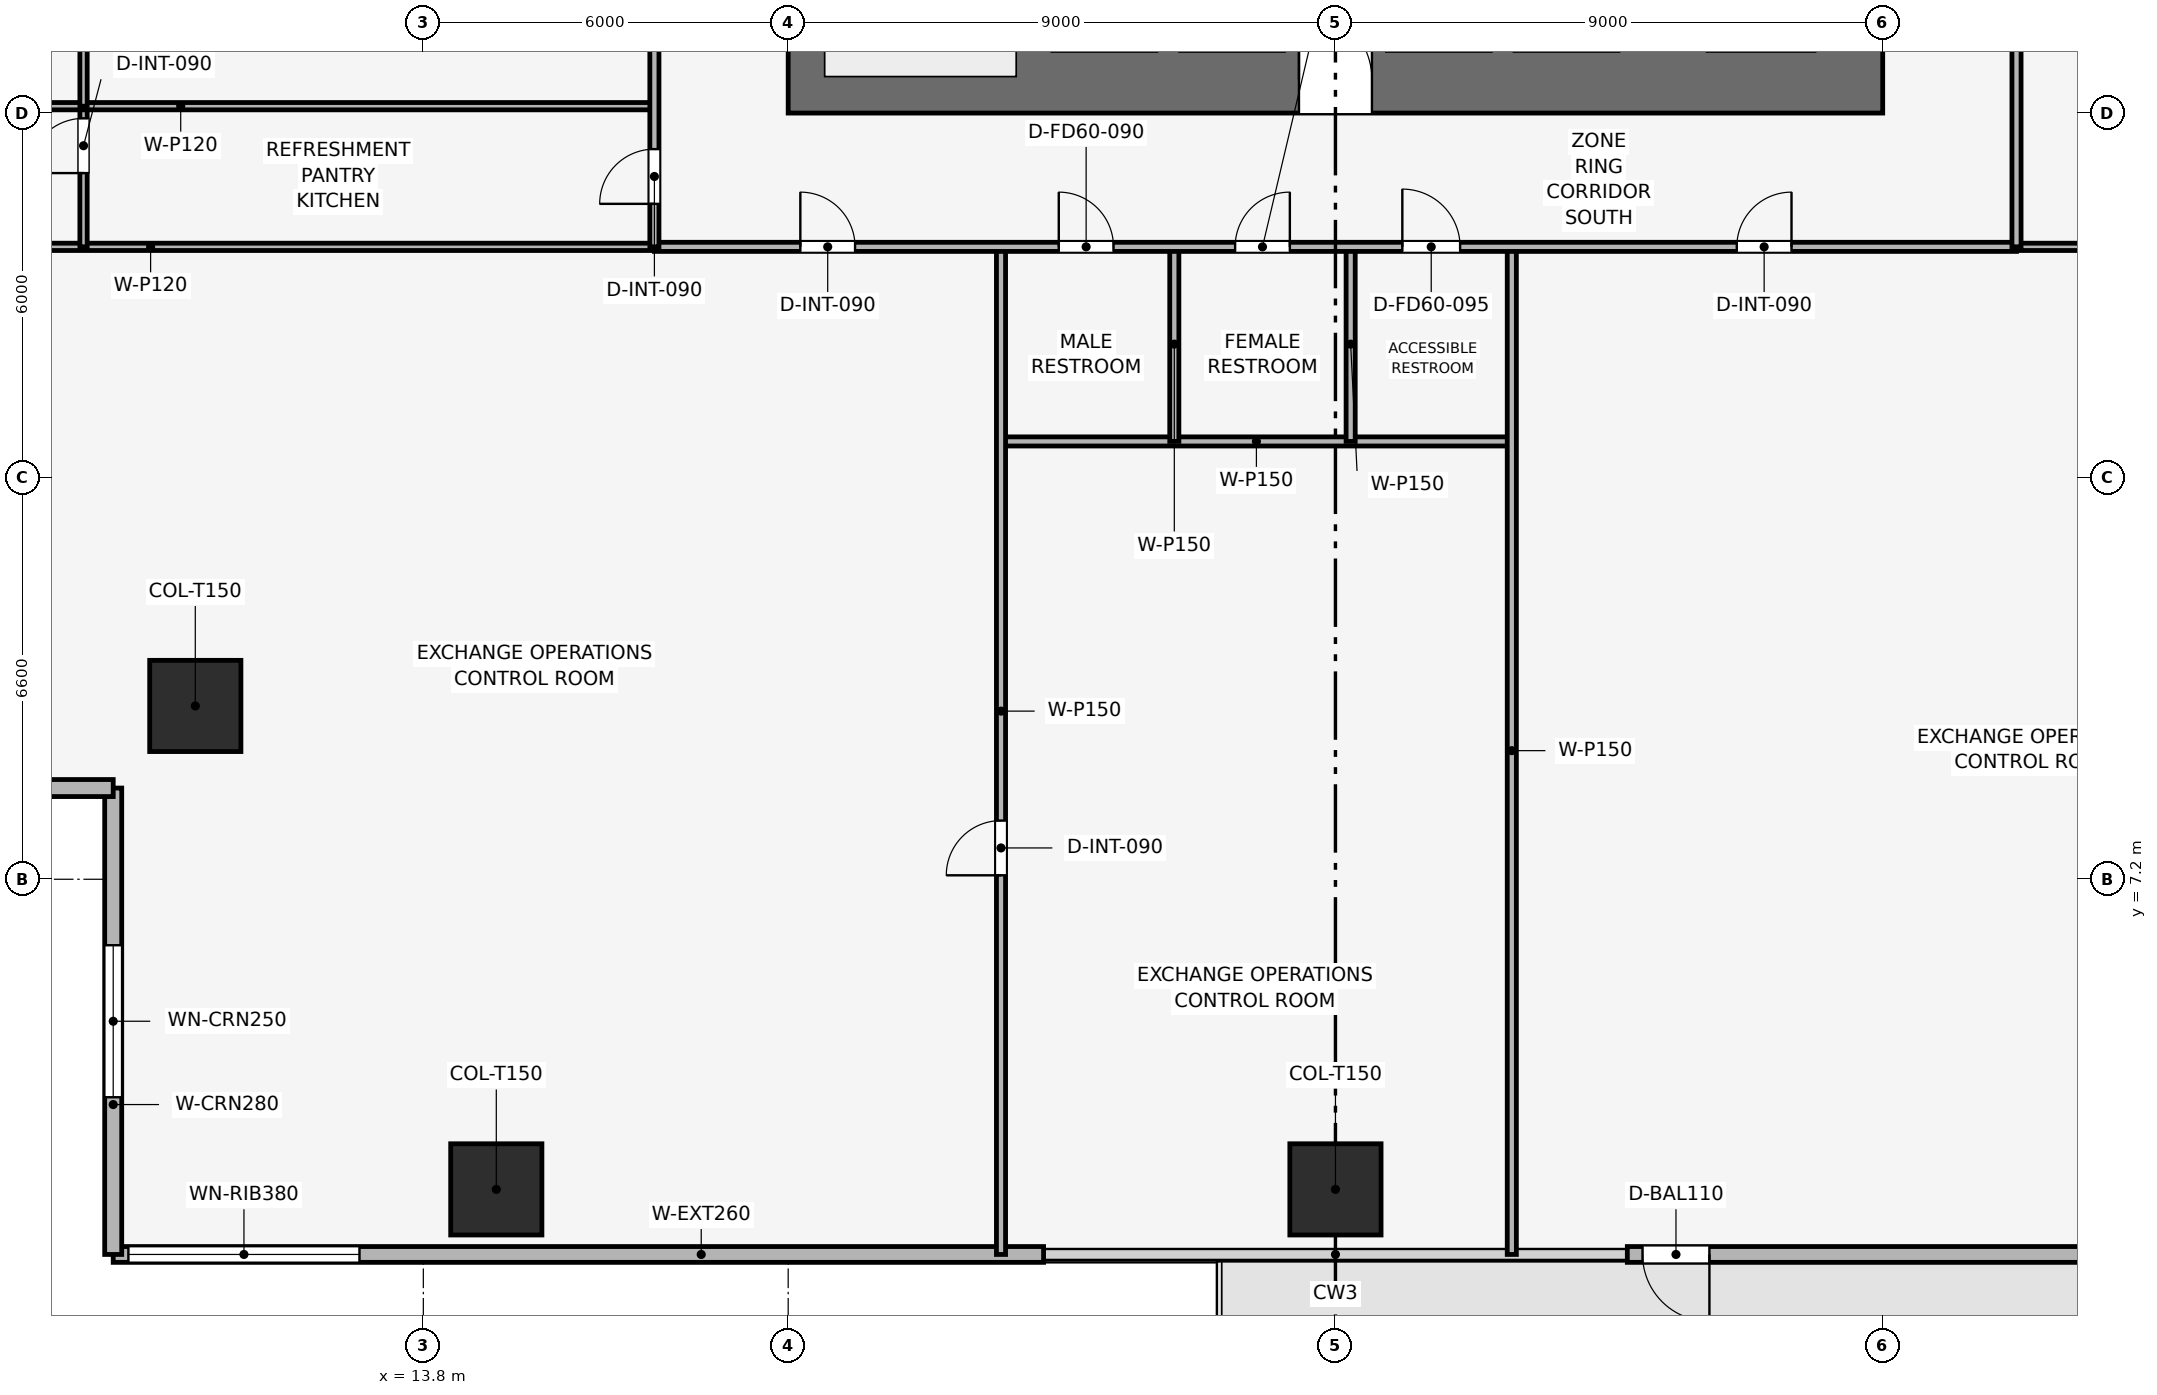
"""IFC4 building model, lengths in metres.
Left out: names, types, materials, properties, quantities, classifications, styles, units other than length and angle.
Written with IfcOpenShell. Run it as: python <this file> out.ifc"""

import sys

from ifc_helpers import new_model, si_unit, direction, frame, frame_2d, origin, origin_2d, place, context, subcontext, project, spatial, rectangle, extrude, element, fill, save


model = new_model("IFC4")
c1 = context("Model", 3, precision=1e-05, world=origin(), true_north=direction((0.0, 1.0)))
c2 = subcontext(c1, "Body", "Model", "MODEL_VIEW")
j1 = project(units=[si_unit("LENGTHUNIT", "METRE"), si_unit("PLANEANGLEUNIT", "RADIAN")], contexts=[c1])
p1 = place(None, origin())
s1 = spatial("IfcSite", under=j1, at=p1, CompositionType="ELEMENT")
p2 = place(p1, origin())
s2 = spatial("IfcBuilding", under=s1, at=p2, CompositionType="ELEMENT")
p3 = place(p2, frame((0.0, 0.0, 80.7)))
s3 = spatial("IfcBuildingStorey", under=s2, at=p3, CompositionType="ELEMENT", Elevation=80.7)
p4 = place(p3, frame((19.8, 20.35, 0.0), z_axis=(0.0, 0.0, 1.0), x_axis=(1.0, 0.0, 0.0)))
e1 = element("IfcWall", 1, at=p4, inside=s3, PredefinedType="SHEAR", context=c2, shape_type="SweptSolid", body=[
    extrude(rectangle(XDim=18.0, YDim=1.1, at=frame_2d((9.0, 0.0))), origin(), (0.0, 0.0, 1.0), 3.9),
])
p5 = place(p4, frame((8.4, 0.0, 0.0)))
e2 = element("IfcOpeningElement", 2, at=p5, cuts=e1, PredefinedType="OPENING", context=c2, shape_type="SweptSolid", body=[
    extrude(rectangle(XDim=1.2, YDim=2.2, at=frame_2d((0.6, 1.1))), frame((0.0, 0.56, 0.0), z_axis=(0.0, -1.0, 0.0), x_axis=(1.0, 0.0, 0.0)), (0.0, 0.0, 1.0), 1.12),
])
for number, where, z_axis, x_axis in (
    (3, (15.0, 2.1, 0.003), (0.0, 0.0, 1.0), (1.0, 0.0, 0.0)),
    (4, (28.8, 2.1, 0.003), (0.0, 0.0, 1.0), (1.0, 0.0, 0.0)),
    (5, (10.05, 10.05, 0.003), (0.0, 0.0, 1.0), (1.0, 0.0, 0.0)),
):
    element("IfcColumn", number, at=place(p3, frame(where, z_axis=z_axis, x_axis=x_axis)), inside=s3, PredefinedType="COLUMN", context=c2, shape_type="SweptSolid", body=[
        extrude(rectangle(XDim=1.5, YDim=1.5, at=origin_2d()), origin(), (0.0, 0.0, 1.0), 3.644),
    ])
p6 = place(p3, frame((48.9, 1.03, 0.0), z_axis=(0.0, 0.0, 1.0), x_axis=(-1.0, 0.0, 0.0)))
e6 = element("IfcWall", 6, at=p6, inside=s3, PredefinedType="SOLIDWALL", context=c2, shape_type="SweptSolid", body=[
    extrude(rectangle(XDim=15.3, YDim=0.26, at=frame_2d((7.65, 0.0))), origin(), (0.0, 0.0, 1.0), 3.65),
])
p7 = place(p6, frame((13.95, 0.0, 0.0)))
e7 = element("IfcOpeningElement", 7, at=p7, cuts=e6, PredefinedType="OPENING", context=c2, shape_type="SweptSolid", body=[
    extrude(rectangle(XDim=1.1, YDim=2.2, at=frame_2d((0.55, 1.1))), frame((0.0, 0.14, 0.0), z_axis=(0.0, -1.0, 0.0), x_axis=(1.0, 0.0, 0.0)), (0.0, 0.0, 1.0), 0.28),
])
p8 = place(p3, frame((24.0, 1.03, 0.0), z_axis=(0.0, 0.0, 1.0), x_axis=(-1.0, 0.0, 0.0)))
e8 = element("IfcWall", 8, at=p8, inside=s3, PredefinedType="SOLIDWALL", context=c2, shape_type="SweptSolid", body=[
    extrude(rectangle(XDim=15.3, YDim=0.26, at=frame_2d((7.65, 0.0))), origin(), (0.0, 0.0, 1.0), 3.65),
])
p9 = place(p8, frame((11.25, 0.0, 0.9)))
e9 = element("IfcOpeningElement", 9, at=p9, cuts=e8, PredefinedType="OPENING", context=c2, shape_type="SweptSolid", body=[
    extrude(rectangle(XDim=3.8, YDim=1.9, at=frame_2d((1.9, 0.95))), frame((0.0, 0.14, 0.0), z_axis=(0.0, -1.0, 0.0), x_axis=(1.0, 0.0, 0.0)), (0.0, 0.0, 1.0), 0.28),
])
p10 = place(p3, frame((8.7, 1.03, 0.0), z_axis=(0.0, 0.0, 1.0), x_axis=(0.0, 1.0, 0.0)))
e10 = element("IfcWall", 10, at=p10, inside=s3, PredefinedType="SOLIDWALL", context=c2, shape_type="SweptSolid", body=[
    extrude(rectangle(XDim=7.67, YDim=0.28, at=frame_2d((3.835, 0.0))), origin(), (0.0, 0.0, 1.0), 3.65),
])
p11 = place(p10, frame((2.585, 0.0, 0.9)))
e11 = element("IfcOpeningElement", 11, at=p11, cuts=e10, PredefinedType="OPENING", context=c2, shape_type="SweptSolid", body=[
    extrude(rectangle(XDim=2.5, YDim=1.9, at=frame_2d((1.25, 0.95))), frame((0.0, 0.15, 0.0), z_axis=(0.0, -1.0, 0.0), x_axis=(1.0, 0.0, 0.0)), (0.0, 0.0, 1.0), 0.3),
])
p12 = place(p3, frame((8.7, 8.7, 0.0), z_axis=(0.0, 0.0, 1.0), x_axis=(-1.0, 0.0, 0.0)))
e12 = element("IfcWall", 12, at=p12, inside=s3, PredefinedType="SOLIDWALL", context=c2, shape_type="SweptSolid", body=[
    extrude(rectangle(XDim=7.67, YDim=0.28, at=frame_2d((3.835, 0.0))), origin(), (0.0, 0.0, 1.0), 3.65),
])
p13 = place(p12, frame((2.585, 0.0, 0.9)))
e13 = element("IfcOpeningElement", 13, at=p13, cuts=e12, PredefinedType="OPENING", context=c2, shape_type="SweptSolid", body=[
    extrude(rectangle(XDim=2.5, YDim=1.9, at=frame_2d((1.25, 0.95))), frame((0.0, 0.15, 0.0), z_axis=(0.0, -1.0, 0.0), x_axis=(1.0, 0.0, 0.0)), (0.0, 0.0, 1.0), 0.3),
])
p14 = place(p3, frame((23.3, 14.4, 0.0), z_axis=(0.0, 0.0, 1.0), x_axis=(1.0, 0.0, 0.0)))
e14 = element("IfcWall", 14, at=p14, inside=s3, PredefinedType="PARTITIONING", context=c2, shape_type="SweptSolid", body=[
    extrude(rectangle(XDim=8.4, YDim=0.15, at=frame_2d((4.2, 0.0))), origin(), (0.0, 0.0, 1.0), 3.085),
])
p15 = place(p3, frame((23.3, 1.03, 0.0), z_axis=(0.0, 0.0, 1.0), x_axis=(0.0, 1.0, 0.0)))
e15 = element("IfcWall", 15, at=p15, inside=s3, PredefinedType="PARTITIONING", context=c2, shape_type="SweptSolid", body=[
    extrude(rectangle(XDim=16.57, YDim=0.15, at=frame_2d((8.285, 0.0))), origin(), (0.0, 0.0, 1.0), 2.935),
])
p16 = place(p15, frame((6.235, 0.0, 0.0)))
e16 = element("IfcOpeningElement", 16, at=p16, cuts=e15, PredefinedType="OPENING", context=c2, shape_type="SweptSolid", body=[
    extrude(rectangle(XDim=0.9, YDim=2.1, at=frame_2d((0.45, 1.05))), frame((0.0, 0.085, 0.0), z_axis=(0.0, -1.0, 0.0), x_axis=(1.0, 0.0, 0.0)), (0.0, 0.0, 1.0), 0.17),
])
p17 = place(p3, frame((31.7, 1.03, 0.0), z_axis=(0.0, 0.0, 1.0), x_axis=(0.0, 1.0, 0.0)))
e17 = element("IfcWall", 17, at=p17, inside=s3, PredefinedType="PARTITIONING", context=c2, shape_type="SweptSolid", body=[
    extrude(rectangle(XDim=16.57, YDim=0.15, at=frame_2d((8.285, 0.0))), origin(), (0.0, 0.0, 1.0), 2.935),
])
for number, where, z_axis, x_axis in (
    (18, (26.15, 14.4, 0.0), (0.0, 0.0, 1.0), (0.0, 1.0, 0.0)),
    (19, (29.05, 14.4, 0.0), (0.0, 0.0, 1.0), (0.0, 1.0, 0.0)),
):
    element("IfcWall", number, at=place(p3, frame(where, z_axis=z_axis, x_axis=x_axis)), inside=s3, PredefinedType="PARTITIONING", context=c2, shape_type="SweptSolid", body=[
        extrude(rectangle(XDim=3.2, YDim=0.15, at=frame_2d((1.6, 0.0))), origin(), (0.0, 0.0, 1.0), 3.65),
    ])
for number, where, z_axis, x_axis in (
    (20, (1.03, 17.6, 0.0), (0.0, 0.0, 1.0), (1.0, 0.0, 0.0)),
    (21, (40.0, 17.6, 0.0), (0.0, 0.0, 1.0), (1.0, 0.0, 0.0)),
):
    element("IfcWall", number, at=place(p3, frame(where, z_axis=z_axis, x_axis=x_axis)), inside=s3, PredefinedType="PARTITIONING", context=c2, shape_type="SweptSolid", body=[
        extrude(rectangle(XDim=16.57, YDim=0.12, at=frame_2d((8.285, 0.0))), origin(), (0.0, 0.0, 1.0), 2.935),
    ])
p18 = place(p3, frame((8.212, 17.6, 0.0), z_axis=(0.0, 0.0, 1.0), x_axis=(0.0, 1.0, 0.0)))
e22 = element("IfcWall", 22, at=p18, inside=s3, PredefinedType="PARTITIONING", context=c2, shape_type="SweptSolid", body=[
    extrude(rectangle(XDim=2.313, YDim=0.12, at=frame_2d((1.156, 0.0))), origin(), (0.0, 0.0, 1.0), 3.65),
])
p19 = place(p18, frame((1.213, 0.0, 0.0)))
e23 = element("IfcOpeningElement", 23, at=p19, cuts=e22, PredefinedType="OPENING", context=c2, shape_type="SweptSolid", body=[
    extrude(rectangle(XDim=0.9, YDim=2.1, at=frame_2d((0.45, 1.05))), frame((0.0, 0.07, 0.0), z_axis=(0.0, -1.0, 0.0), x_axis=(1.0, 0.0, 0.0)), (0.0, 0.0, 1.0), 0.14),
])
p20 = place(p3, frame((1.03, 19.913, 0.0), z_axis=(0.0, 0.0, 1.0), x_axis=(1.0, 0.0, 0.0)))
e24 = element("IfcWall", 24, at=p20, inside=s3, PredefinedType="PARTITIONING", context=c2, shape_type="SweptSolid", body=[
    extrude(rectangle(XDim=16.57, YDim=0.12, at=frame_2d((8.285, 0.0))), origin(), (0.0, 0.0, 1.0), 2.935),
])
p21 = place(p3, frame((8.212, 19.913, 0.0), z_axis=(0.0, 0.0, 1.0), x_axis=(0.0, 1.0, 0.0)))
e25 = element("IfcWall", 25, at=p21, inside=s3, PredefinedType="PARTITIONING", context=c2, shape_type="SweptSolid", body=[
    extrude(rectangle(XDim=5.764, YDim=0.12, at=frame_2d((2.882, 0.0))), origin(), (0.0, 0.0, 1.0), 3.085),
])
p22 = place(p21, frame((1.502, 0.0, 0.0)))
e26 = element("IfcOpeningElement", 26, at=p22, cuts=e25, PredefinedType="OPENING", context=c2, shape_type="SweptSolid", body=[
    extrude(rectangle(XDim=0.9, YDim=2.1, at=frame_2d((0.45, 1.05))), frame((0.0, 0.07, 0.0), z_axis=(0.0, -1.0, 0.0), x_axis=(1.0, 0.0, 0.0)), (0.0, 0.0, 1.0), 0.14),
])
p23 = place(p3, frame((17.6, 17.6, 0.0), z_axis=(0.0, 0.0, 1.0), x_axis=(1.0, 0.0, 0.0)))
e27 = element("IfcWall", 27, at=p23, inside=s3, PredefinedType="PARTITIONING", context=c2, shape_type="SweptSolid", body=[
    extrude(rectangle(XDim=22.4, YDim=0.15, at=frame_2d((11.2, 0.0))), origin(), (0.0, 0.0, 1.0), 3.085),
])
p24 = place(p23, frame((2.4, 0.0, 0.0)))
e28 = element("IfcOpeningElement", 28, at=p24, cuts=e27, PredefinedType="OPENING", context=c2, shape_type="SweptSolid", body=[
    extrude(rectangle(XDim=0.9, YDim=2.1, at=frame_2d((0.45, 1.05))), frame((0.0, 0.085, 0.0), z_axis=(0.0, -1.0, 0.0), x_axis=(1.0, 0.0, 0.0)), (0.0, 0.0, 1.0), 0.17),
])
p25 = place(p23, frame((6.65, 0.0, 0.0)))
e29 = element("IfcOpeningElement", 29, at=p25, cuts=e27, PredefinedType="OPENING", context=c2, shape_type="SweptSolid", body=[
    extrude(rectangle(XDim=0.9, YDim=2.1, at=frame_2d((0.45, 1.05))), frame((0.0, 0.085, 0.0), z_axis=(0.0, -1.0, 0.0), x_axis=(1.0, 0.0, 0.0)), (0.0, 0.0, 1.0), 0.17),
])
p26 = place(p23, frame((9.55, 0.0, 0.0)))
e30 = element("IfcOpeningElement", 30, at=p26, cuts=e27, PredefinedType="OPENING", context=c2, shape_type="SweptSolid", body=[
    extrude(rectangle(XDim=0.9, YDim=2.1, at=frame_2d((0.45, 1.05))), frame((0.0, 0.085, 0.0), z_axis=(0.0, -1.0, 0.0), x_axis=(1.0, 0.0, 0.0)), (0.0, 0.0, 1.0), 0.17),
])
p27 = place(p23, frame((12.3, 0.0, 0.0)))
e31 = element("IfcOpeningElement", 31, at=p27, cuts=e27, PredefinedType="OPENING", context=c2, shape_type="SweptSolid", body=[
    extrude(rectangle(XDim=0.95, YDim=2.1, at=frame_2d((0.475, 1.05))), frame((0.0, 0.085, 0.0), z_axis=(0.0, -1.0, 0.0), x_axis=(1.0, 0.0, 0.0)), (0.0, 0.0, 1.0), 0.17),
])
p28 = place(p23, frame((17.8, 0.0, 0.0)))
e32 = element("IfcOpeningElement", 32, at=p28, cuts=e27, PredefinedType="OPENING", context=c2, shape_type="SweptSolid", body=[
    extrude(rectangle(XDim=0.9, YDim=2.1, at=frame_2d((0.45, 1.05))), frame((0.0, 0.085, 0.0), z_axis=(0.0, -1.0, 0.0), x_axis=(1.0, 0.0, 0.0)), (0.0, 0.0, 1.0), 0.17),
])
p29 = place(p3, frame((17.6, 17.6, 0.0), z_axis=(0.0, 0.0, 1.0), x_axis=(0.0, 1.0, 0.0)))
e33 = element("IfcWall", 33, at=p29, inside=s3, PredefinedType="PARTITIONING", context=c2, shape_type="SweptSolid", body=[
    extrude(rectangle(XDim=22.4, YDim=0.15, at=frame_2d((11.2, 0.0))), origin(), (0.0, 0.0, 1.0), 3.085),
])
p30 = place(p29, frame((0.707, 0.0, 0.0)))
e34 = element("IfcOpeningElement", 34, at=p30, cuts=e33, PredefinedType="OPENING", context=c2, shape_type="SweptSolid", body=[
    extrude(rectangle(XDim=0.9, YDim=2.1, at=frame_2d((0.45, 1.05))), frame((0.0, 0.085, 0.0), z_axis=(0.0, -1.0, 0.0), x_axis=(1.0, 0.0, 0.0)), (0.0, 0.0, 1.0), 0.17),
])
p31 = place(p29, frame((4.745, 0.0, 0.0)))
e35 = element("IfcOpeningElement", 35, at=p31, cuts=e33, PredefinedType="OPENING", context=c2, shape_type="SweptSolid", body=[
    extrude(rectangle(XDim=0.9, YDim=2.1, at=frame_2d((0.45, 1.05))), frame((0.0, 0.085, 0.0), z_axis=(0.0, -1.0, 0.0), x_axis=(1.0, 0.0, 0.0)), (0.0, 0.0, 1.0), 0.17),
])
p32 = place(p29, frame((10.769, 0.0, 0.0)))
e36 = element("IfcOpeningElement", 36, at=p32, cuts=e33, PredefinedType="OPENING", context=c2, shape_type="SweptSolid", body=[
    extrude(rectangle(XDim=0.9, YDim=2.1, at=frame_2d((0.45, 1.05))), frame((0.0, 0.085, 0.0), z_axis=(0.0, -1.0, 0.0), x_axis=(1.0, 0.0, 0.0)), (0.0, 0.0, 1.0), 0.17),
])
p33 = place(p29, frame((17.931, 0.0, 0.0)))
e37 = element("IfcOpeningElement", 37, at=p33, cuts=e33, PredefinedType="OPENING", context=c2, shape_type="SweptSolid", body=[
    extrude(rectangle(XDim=0.9, YDim=2.1, at=frame_2d((0.45, 1.05))), frame((0.0, 0.085, 0.0), z_axis=(0.0, -1.0, 0.0), x_axis=(1.0, 0.0, 0.0)), (0.0, 0.0, 1.0), 0.17),
])
p34 = place(p3, frame((40.0, 17.6, 0.0), z_axis=(0.0, 0.0, 1.0), x_axis=(0.0, 1.0, 0.0)))
e38 = element("IfcWall", 38, at=p34, inside=s3, PredefinedType="PARTITIONING", context=c2, shape_type="SweptSolid", body=[
    extrude(rectangle(XDim=22.4, YDim=0.15, at=frame_2d((11.2, 0.0))), origin(), (0.0, 0.0, 1.0), 3.085),
])
p35 = place(p34, frame((10.75, 0.0, 0.0)))
e39 = element("IfcOpeningElement", 39, at=p35, cuts=e38, PredefinedType="OPENING", context=c2, shape_type="SweptSolid", body=[
    extrude(rectangle(XDim=0.9, YDim=2.1, at=frame_2d((0.45, 1.05))), frame((0.0, 0.085, 0.0), z_axis=(0.0, -1.0, 0.0), x_axis=(1.0, 0.0, 0.0)), (0.0, 0.0, 1.0), 0.17),
])
p36 = place(p7, origin())
e40 = element("IfcDoor", 40, at=p36, inside=s3, OperationType="SINGLE_SWING_LEFT", PredefinedType="DOOR", context=c2, shape_type="SweptSolid", body=[
    extrude(rectangle(XDim=1.1, YDim=2.2, at=frame_2d((0.55, 1.1))), frame((0.0, 0.025, 0.0), z_axis=(0.0, -1.0, 0.0), x_axis=(1.0, 0.0, 0.0)), (0.0, 0.0, 1.0), 0.05),
])
fill(e7, e40)
p37 = place(p9, origin())
e41 = element("IfcWindow", 41, at=p37, inside=s3, PartitioningType="SINGLE_PANEL", PredefinedType="WINDOW", context=c2, shape_type="SweptSolid", body=[
    extrude(rectangle(XDim=3.8, YDim=1.9, at=frame_2d((1.9, 0.95))), frame((0.0, 0.03, 0.0), z_axis=(0.0, -1.0, 0.0), x_axis=(1.0, 0.0, 0.0)), (0.0, 0.0, 1.0), 0.06),
])
fill(e9, e41)
p38 = place(p11, origin())
e42 = element("IfcWindow", 42, at=p38, inside=s3, PartitioningType="SINGLE_PANEL", PredefinedType="WINDOW", context=c2, shape_type="SweptSolid", body=[
    extrude(rectangle(XDim=2.5, YDim=1.9, at=frame_2d((1.25, 0.95))), frame((0.0, 0.03, 0.0), z_axis=(0.0, -1.0, 0.0), x_axis=(1.0, 0.0, 0.0)), (0.0, 0.0, 1.0), 0.06),
])
fill(e11, e42)
p39 = place(p16, origin())
e43 = element("IfcDoor", 43, at=p39, inside=s3, OperationType="SINGLE_SWING_LEFT", PredefinedType="DOOR", context=c2, shape_type="SweptSolid", body=[
    extrude(rectangle(XDim=0.9, YDim=2.1, at=frame_2d((0.45, 1.05))), frame((0.0, 0.025, 0.0), z_axis=(0.0, -1.0, 0.0), x_axis=(1.0, 0.0, 0.0)), (0.0, 0.0, 1.0), 0.05),
])
fill(e16, e43)
p40 = place(p19, origin())
e44 = element("IfcDoor", 44, at=p40, inside=s3, OperationType="SINGLE_SWING_LEFT", PredefinedType="DOOR", context=c2, shape_type="SweptSolid", body=[
    extrude(rectangle(XDim=0.9, YDim=2.1, at=frame_2d((0.45, 1.05))), frame((0.0, 0.025, 0.0), z_axis=(0.0, -1.0, 0.0), x_axis=(1.0, 0.0, 0.0)), (0.0, 0.0, 1.0), 0.05),
])
fill(e23, e44)
p41 = place(p24, origin())
e45 = element("IfcDoor", 45, at=p41, inside=s3, OperationType="SINGLE_SWING_LEFT", PredefinedType="DOOR", context=c2, shape_type="SweptSolid", body=[
    extrude(rectangle(XDim=0.9, YDim=2.1, at=frame_2d((0.45, 1.05))), frame((0.0, 0.025, 0.0), z_axis=(0.0, -1.0, 0.0), x_axis=(1.0, 0.0, 0.0)), (0.0, 0.0, 1.0), 0.05),
])
fill(e28, e45)
p42 = place(p25, origin())
e46 = element("IfcDoor", 46, at=p42, inside=s3, OperationType="SINGLE_SWING_LEFT", PredefinedType="DOOR", context=c2, shape_type="SweptSolid", body=[
    extrude(rectangle(XDim=0.9, YDim=2.1, at=frame_2d((0.45, 1.05))), frame((0.0, 0.025, 0.0), z_axis=(0.0, -1.0, 0.0), x_axis=(1.0, 0.0, 0.0)), (0.0, 0.0, 1.0), 0.05),
])
fill(e29, e46)
p43 = place(p26, origin())
e47 = element("IfcDoor", 47, at=p43, inside=s3, OperationType="SINGLE_SWING_RIGHT", PredefinedType="DOOR", context=c2, shape_type="SweptSolid", body=[
    extrude(rectangle(XDim=0.9, YDim=2.1, at=frame_2d((0.45, 1.05))), frame((0.0, 0.025, 0.0), z_axis=(0.0, -1.0, 0.0), x_axis=(1.0, 0.0, 0.0)), (0.0, 0.0, 1.0), 0.05),
])
fill(e30, e47)
p44 = place(p27, origin())
e48 = element("IfcDoor", 48, at=p44, inside=s3, OperationType="SINGLE_SWING_LEFT", PredefinedType="DOOR", context=c2, shape_type="SweptSolid", body=[
    extrude(rectangle(XDim=0.95, YDim=2.1, at=frame_2d((0.475, 1.05))), frame((0.0, 0.025, 0.0), z_axis=(0.0, -1.0, 0.0), x_axis=(1.0, 0.0, 0.0)), (0.0, 0.0, 1.0), 0.05),
])
fill(e31, e48)
p45 = place(p28, origin())
e49 = element("IfcDoor", 49, at=p45, inside=s3, OperationType="SINGLE_SWING_RIGHT", PredefinedType="DOOR", context=c2, shape_type="SweptSolid", body=[
    extrude(rectangle(XDim=0.9, YDim=2.1, at=frame_2d((0.45, 1.05))), frame((0.0, 0.025, 0.0), z_axis=(0.0, -1.0, 0.0), x_axis=(1.0, 0.0, 0.0)), (0.0, 0.0, 1.0), 0.05),
])
fill(e32, e49)
p46 = place(p30, origin())
e50 = element("IfcDoor", 50, at=p46, inside=s3, OperationType="SINGLE_SWING_LEFT", PredefinedType="DOOR", context=c2, shape_type="SweptSolid", body=[
    extrude(rectangle(XDim=0.9, YDim=2.1, at=frame_2d((0.45, 1.05))), frame((0.0, 0.025, 0.0), z_axis=(0.0, -1.0, 0.0), x_axis=(1.0, 0.0, 0.0)), (0.0, 0.0, 1.0), 0.05),
])
fill(e34, e50)
p47 = place(p5, origin())
e51 = element("IfcDoor", 51, at=p47, inside=s3, OperationType="SINGLE_SWING_LEFT", PredefinedType="DOOR", context=c2, shape_type="SweptSolid", body=[
    extrude(rectangle(XDim=1.2, YDim=2.2, at=frame_2d((0.6, 1.1))), frame((0.0, 0.025, 0.0), z_axis=(0.0, -1.0, 0.0), x_axis=(1.0, 0.0, 0.0)), (0.0, 0.0, 1.0), 0.05),
])
fill(e2, e51)
save(model, sys.argv[1])
